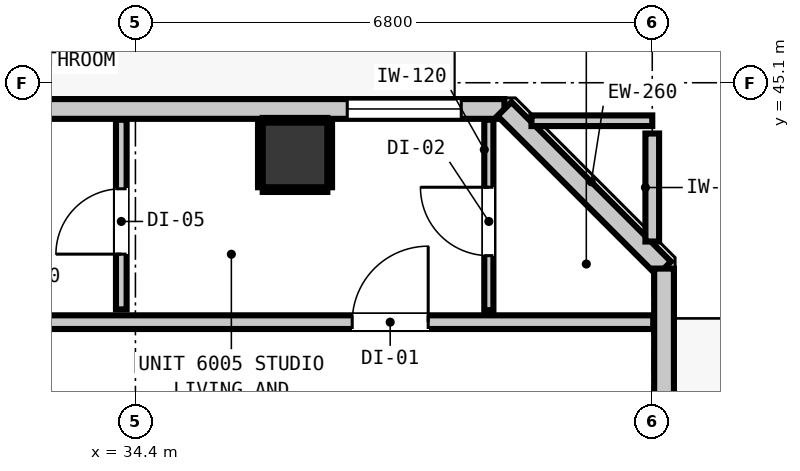
"""IFC4 building model, lengths in metres.
Left out: names, types, materials, properties, quantities, classifications, styles, units other than length and angle.
Written with IfcOpenShell. Run it as: python <this file> out.ifc"""

import sys

from ifc_helpers import new_model, si_unit, direction, frame, frame_2d, origin, origin_2d, place, context, subcontext, project, spatial, rectangle, extrude, element, fill, save


model = new_model("IFC4")
c1 = context("Model", 3, precision=1e-05, world=origin(), true_north=direction((0.0, 1.0)))
c2 = subcontext(c1, "Body", "Model", "MODEL_VIEW")
j1 = project(units=[si_unit("LENGTHUNIT", "METRE"), si_unit("PLANEANGLEUNIT", "RADIAN")], contexts=[c1])
p1 = place(None, origin())
s1 = spatial("IfcSite", under=j1, at=p1, CompositionType="ELEMENT")
p2 = place(p1, origin())
s2 = spatial("IfcBuilding", under=s1, at=p2, CompositionType="ELEMENT")
p3 = place(p2, frame((0.0, 0.0, 206.76)))
s3 = spatial("IfcBuildingStorey", under=s2, at=p3, CompositionType="ELEMENT", Elevation=206.76)
p4 = place(p3, frame((36.5, 44.15, 0.0), z_axis=(0.0, 0.0, 1.0), x_axis=(1.0, 0.0, 0.0)))
e1 = element("IfcColumn", 1, at=p4, inside=s3, PredefinedType="COLUMN", context=c2, shape_type="SweptSolid", body=[
    extrude(rectangle(XDim=0.85, YDim=0.85, at=origin_2d()), origin(), (0.0, 0.0, 1.0), 2.9),
])
p5 = place(p3, frame((6.545, 44.755, 0.0), z_axis=(0.0, 0.0, 1.0), x_axis=(1.0, 0.0, 0.0)))
e2 = element("IfcWall", 2, at=p5, inside=s3, PredefinedType="STANDARD", context=c2, shape_type="SweptSolid", body=[
    extrude(rectangle(XDim=32.71, YDim=0.26, at=frame_2d((16.355, 0.0))), origin(), (0.0, 0.0, 1.0), 2.9),
])
p6 = place(p5, frame((0.907, 0.0, 0.0)))
e3 = element("IfcOpeningElement", 3, at=p6, cuts=e2, PredefinedType="OPENING", context=c2, shape_type="SweptSolid", body=[
    extrude(rectangle(XDim=1.0, YDim=2.15, at=frame_2d((0.5, 1.075))), frame((0.0, 0.14, 0.0), z_axis=(0.0, -1.0, 0.0), x_axis=(1.0, 0.0, 0.0)), (0.0, 0.0, 1.0), 0.28),
])
p7 = place(p5, frame((9.805, 0.0, 0.85)))
e4 = element("IfcOpeningElement", 4, at=p7, cuts=e2, PredefinedType="OPENING", context=c2, shape_type="SweptSolid", body=[
    extrude(rectangle(XDim=1.5, YDim=1.8, at=frame_2d((0.75, 0.9))), frame((0.0, 0.14, 0.0), z_axis=(0.0, -1.0, 0.0), x_axis=(1.0, 0.0, 0.0)), (0.0, 0.0, 1.0), 0.28),
])
p8 = place(p5, frame((19.116, 0.0, 0.85)))
e5 = element("IfcOpeningElement", 5, at=p8, cuts=e2, PredefinedType="OPENING", context=c2, shape_type="SweptSolid", body=[
    extrude(rectangle(XDim=1.5, YDim=1.8, at=frame_2d((0.75, 0.9))), frame((0.0, 0.14, 0.0), z_axis=(0.0, -1.0, 0.0), x_axis=(1.0, 0.0, 0.0)), (0.0, 0.0, 1.0), 0.28),
])
p9 = place(p5, frame((30.642, 0.0, 0.85)))
e6 = element("IfcOpeningElement", 6, at=p9, cuts=e2, PredefinedType="OPENING", context=c2, shape_type="SweptSolid", body=[
    extrude(rectangle(XDim=1.5, YDim=1.8, at=frame_2d((0.75, 0.9))), frame((0.0, 0.14, 0.0), z_axis=(0.0, -1.0, 0.0), x_axis=(1.0, 0.0, 0.0)), (0.0, 0.0, 1.0), 0.28),
])
p10 = place(p3, frame((39.255, 44.755, 0.0), z_axis=(0.0, 0.0, 1.0), x_axis=(0.707147883682, -0.707065676302, 0.0)))
e7 = element("IfcWall", 7, at=p10, inside=s3, PredefinedType="STANDARD", context=c2, shape_type="SweptSolid", body=[
    extrude(rectangle(XDim=2.97, YDim=0.26, at=frame_2d((1.485, 0.0))), origin(), (0.0, 0.0, 1.0), 2.9),
])
p11 = place(p3, frame((41.355, 42.655, 0.0), z_axis=(0.0, 0.0, 1.0), x_axis=(0.0, -1.0, 0.0)))
e8 = element("IfcWall", 8, at=p11, inside=s3, PredefinedType="STANDARD", context=c2, shape_type="SweptSolid", body=[
    extrude(rectangle(XDim=30.31, YDim=0.26, at=frame_2d((15.155, 0.0))), origin(), (0.0, 0.0, 1.0), 2.9),
])
p12 = place(p11, frame((23.818, 0.0, 0.0)))
e9 = element("IfcOpeningElement", 9, at=p12, cuts=e8, PredefinedType="OPENING", context=c2, shape_type="SweptSolid", body=[
    extrude(rectangle(XDim=1.0, YDim=2.15, at=frame_2d((0.5, 1.075))), frame((0.0, 0.14, 0.0), z_axis=(0.0, -1.0, 0.0), x_axis=(1.0, 0.0, 0.0)), (0.0, 0.0, 1.0), 0.28),
])
p13 = place(p11, frame((26.869, 0.0, 0.85)))
e10 = element("IfcOpeningElement", 10, at=p13, cuts=e8, PredefinedType="OPENING", context=c2, shape_type="SweptSolid", body=[
    extrude(rectangle(XDim=1.5, YDim=1.8, at=frame_2d((0.75, 0.9))), frame((0.0, 0.14, 0.0), z_axis=(0.0, -1.0, 0.0), x_axis=(1.0, 0.0, 0.0)), (0.0, 0.0, 1.0), 0.28),
])
p14 = place(p3, frame((4.587, 41.95, 0.0), z_axis=(0.0, 0.0, 1.0), x_axis=(1.0, 0.0, 0.0)))
e11 = element("IfcWall", 11, at=p14, inside=s3, PredefinedType="PARTITIONING", context=c2, shape_type="SweptSolid", body=[
    extrude(rectangle(XDim=36.626, YDim=0.18, at=frame_2d((18.313, 0.0))), origin(), (0.0, 0.0, 1.0), 2.9),
])
p15 = place(p14, frame((3.023, 0.0, 0.0)))
e12 = element("IfcOpeningElement", 12, at=p15, cuts=e11, PredefinedType="OPENING", context=c2, shape_type="SweptSolid", body=[
    extrude(rectangle(XDim=1.0, YDim=2.15, at=frame_2d((0.5, 1.075))), frame((0.0, 0.1, 0.0), z_axis=(0.0, -1.0, 0.0), x_axis=(1.0, 0.0, 0.0)), (0.0, 0.0, 1.0), 0.2),
])
p16 = place(p14, frame((12.013, 0.0, 0.0)))
e13 = element("IfcOpeningElement", 13, at=p16, cuts=e11, PredefinedType="OPENING", context=c2, shape_type="SweptSolid", body=[
    extrude(rectangle(XDim=1.0, YDim=2.15, at=frame_2d((0.5, 1.075))), frame((0.0, 0.1, 0.0), z_axis=(0.0, -1.0, 0.0), x_axis=(1.0, 0.0, 0.0)), (0.0, 0.0, 1.0), 0.2),
])
p17 = place(p14, frame((21.324, 0.0, 0.0)))
e14 = element("IfcOpeningElement", 14, at=p17, cuts=e11, PredefinedType="OPENING", context=c2, shape_type="SweptSolid", body=[
    extrude(rectangle(XDim=1.0, YDim=2.15, at=frame_2d((0.5, 1.075))), frame((0.0, 0.1, 0.0), z_axis=(0.0, -1.0, 0.0), x_axis=(1.0, 0.0, 0.0)), (0.0, 0.0, 1.0), 0.2),
])
p18 = place(p14, frame((32.665, 0.0, 0.0)))
e15 = element("IfcOpeningElement", 15, at=p18, cuts=e11, PredefinedType="OPENING", context=c2, shape_type="SweptSolid", body=[
    extrude(rectangle(XDim=1.0, YDim=2.15, at=frame_2d((0.5, 1.075))), frame((0.0, 0.1, 0.0), z_axis=(0.0, -1.0, 0.0), x_axis=(1.0, 0.0, 0.0)), (0.0, 0.0, 1.0), 0.2),
])
p19 = place(p3, frame((39.611, 44.6, 0.0), z_axis=(0.0, 0.0, 1.0), x_axis=(1.0, 0.0, 0.0)))
e16 = element("IfcWall", 16, at=p19, inside=s3, PredefinedType="PARTITIONING", context=c2, shape_type="SweptSolid", body=[
    extrude(rectangle(XDim=1.589, YDim=0.14, at=frame_2d((0.794, 0.0))), origin(), (0.0, 0.0, 1.0), 2.9),
])
p20 = place(p3, frame((41.2, 43.011, 0.0), z_axis=(0.0, 0.0, 1.0), x_axis=(0.0, 1.0, 0.0)))
e17 = element("IfcWall", 17, at=p20, inside=s3, PredefinedType="PARTITIONING", context=c2, shape_type="SweptSolid", body=[
    extrude(rectangle(XDim=1.421, YDim=0.18, at=frame_2d((0.71, 0.0))), origin(), (0.0, 0.0, 1.0), 2.9),
])
p21 = place(p3, frame((34.214, 42.118, 0.0), z_axis=(0.0, 0.0, 1.0), x_axis=(0.0, 1.0, 0.0)))
e18 = element("IfcWall", 18, at=p21, inside=s3, PredefinedType="PARTITIONING", context=c2, shape_type="SweptSolid", body=[
    extrude(rectangle(XDim=2.495, YDim=0.14, at=frame_2d((1.248, 0.0))), origin(), (0.0, 0.0, 1.0), 2.9),
])
p22 = place(p21, frame((0.727, 0.0, 0.0)))
e19 = element("IfcOpeningElement", 19, at=p22, cuts=e18, PredefinedType="OPENING", context=c2, shape_type="SweptSolid", body=[
    extrude(rectangle(XDim=0.86, YDim=2.02, at=frame_2d((0.43, 1.01))), frame((0.0, 0.08, 0.0), z_axis=(0.0, -1.0, 0.0), x_axis=(1.0, 0.0, 0.0)), (0.0, 0.0, 1.0), 0.16),
])
p23 = place(p3, frame((39.05, 42.108, 0.0), z_axis=(0.0, 0.0, 1.0), x_axis=(0.0, 1.0, 0.0)))
e20 = element("IfcWall", 20, at=p23, inside=s3, PredefinedType="PARTITIONING", context=c2, shape_type="SweptSolid", body=[
    extrude(rectangle(XDim=2.505, YDim=0.12, at=frame_2d((1.252, 0.0))), origin(), (0.0, 0.0, 1.0), 2.9),
])
p24 = place(p23, frame((0.717, 0.0, 0.0)))
e21 = element("IfcOpeningElement", 21, at=p24, cuts=e20, PredefinedType="OPENING", context=c2, shape_type="SweptSolid", body=[
    extrude(rectangle(XDim=0.9, YDim=2.1, at=frame_2d((0.45, 1.05))), frame((0.0, 0.07, 0.0), z_axis=(0.0, -1.0, 0.0), x_axis=(1.0, 0.0, 0.0)), (0.0, 0.0, 1.0), 0.14),
])
for number, where, z_axis, x_axis in (
    (22, (36.075, 43.693, 0.0), (0.0, 0.0, 1.0), (1.0, 0.0, 0.0)),
    (23, (36.075, 44.607, 0.0), (0.0, 0.0, 1.0), (1.0, 0.0, 0.0)),
):
    element("IfcWall", number, at=place(p3, frame(where, z_axis=z_axis, x_axis=x_axis)), inside=s3, PredefinedType="PARTITIONING", context=c2, shape_type="SweptSolid", body=[
        extrude(rectangle(XDim=0.85, YDim=0.06, at=frame_2d((0.425, 0.0))), origin(), (0.0, 0.0, 1.0), 1.45),
    ])
for number, where, z_axis, x_axis in (
    (24, (36.043, 43.725, 0.0), (0.0, 0.0, 1.0), (0.0, 1.0, 0.0)),
    (25, (36.957, 43.725, 0.0), (0.0, 0.0, 1.0), (0.0, 1.0, 0.0)),
):
    element("IfcWall", number, at=place(p3, frame(where, z_axis=z_axis, x_axis=x_axis)), inside=s3, PredefinedType="PARTITIONING", context=c2, shape_type="SweptSolid", body=[
        extrude(rectangle(XDim=0.85, YDim=0.06, at=frame_2d((0.425, 0.0))), origin(), (0.0, 0.0, 1.0), 0.905),
    ])
p25 = place(p9, origin())
e26 = element("IfcWindow", 26, at=p25, inside=s3, PartitioningType="SINGLE_PANEL", PredefinedType="WINDOW", context=c2, shape_type="SweptSolid", body=[
    extrude(rectangle(XDim=1.5, YDim=1.8, at=frame_2d((0.75, 0.9))), frame((0.0, 0.03, 0.0), z_axis=(0.0, -1.0, 0.0), x_axis=(1.0, 0.0, 0.0)), (0.0, 0.0, 1.0), 0.06),
])
fill(e6, e26)
p26 = place(p18, origin())
e27 = element("IfcDoor", 27, at=p26, inside=s3, OperationType="SINGLE_SWING_RIGHT", PredefinedType="DOOR", context=c2, shape_type="SweptSolid", body=[
    extrude(rectangle(XDim=1.0, YDim=2.15, at=frame_2d((0.5, 1.075))), frame((0.0, 0.025, 0.0), z_axis=(0.0, -1.0, 0.0), x_axis=(1.0, 0.0, 0.0)), (0.0, 0.0, 1.0), 0.05),
])
fill(e15, e27)
p27 = place(p22, origin())
e28 = element("IfcDoor", 28, at=p27, inside=s3, OperationType="SINGLE_SWING_LEFT", PredefinedType="DOOR", context=c2, shape_type="SweptSolid", body=[
    extrude(rectangle(XDim=0.86, YDim=2.02, at=frame_2d((0.43, 1.01))), frame((0.0, 0.025, 0.0), z_axis=(0.0, -1.0, 0.0), x_axis=(1.0, 0.0, 0.0)), (0.0, 0.0, 1.0), 0.05),
])
fill(e19, e28)
p28 = place(p24, origin())
e29 = element("IfcDoor", 29, at=p28, inside=s3, OperationType="SINGLE_SWING_RIGHT", PredefinedType="DOOR", context=c2, shape_type="SweptSolid", body=[
    extrude(rectangle(XDim=0.9, YDim=2.1, at=frame_2d((0.45, 1.05))), frame((0.0, 0.025, 0.0), z_axis=(0.0, -1.0, 0.0), x_axis=(1.0, 0.0, 0.0)), (0.0, 0.0, 1.0), 0.05),
])
fill(e21, e29)
save(model, sys.argv[1])
